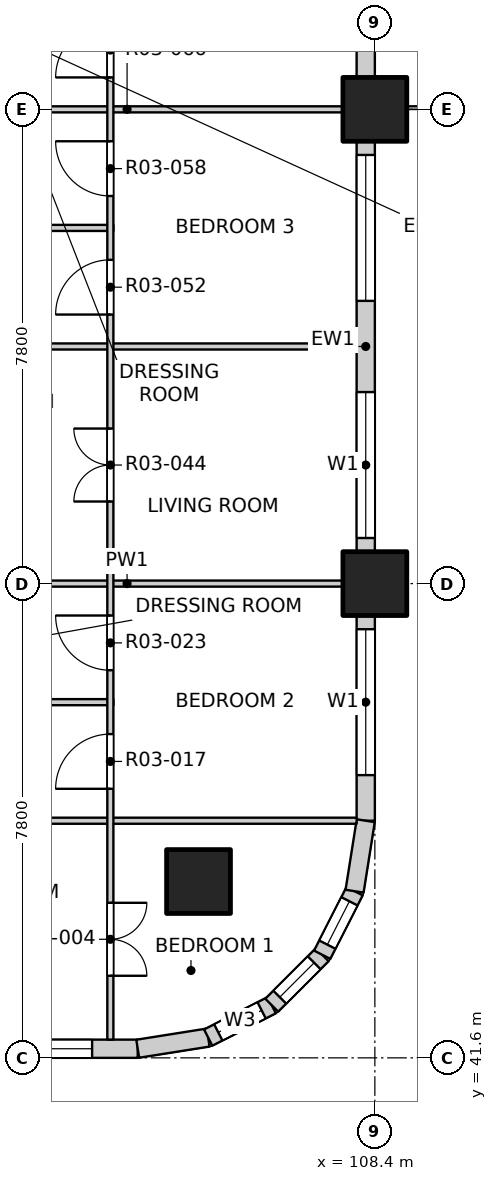
"""IFC4 building model, lengths in metres.
Left out: names, types, materials, properties, quantities, classifications, styles, units other than length and angle.
Written with IfcOpenShell. Run it as: python <this file> out.ifc"""

import sys

from ifc_helpers import new_model, si_unit, direction, frame, frame_2d, origin, origin_2d, place, context, subcontext, project, spatial, rectangle, extrude, element, fill, save


model = new_model("IFC4")
c1 = context("Model", 3, precision=1e-05, world=origin(), true_north=direction((0.0, 1.0)))
c2 = subcontext(c1, "Body", "Model", "MODEL_VIEW")
j1 = project(units=[si_unit("LENGTHUNIT", "METRE"), si_unit("PLANEANGLEUNIT", "RADIAN")], contexts=[c1])
p1 = place(None, origin())
s1 = spatial("IfcSite", under=j1, at=p1, CompositionType="ELEMENT")
p2 = place(p1, origin())
s2 = spatial("IfcBuilding", under=s1, at=p2, CompositionType="ELEMENT")
p3 = place(p2, frame((0.0, 0.0, 43.3)))
s3 = spatial("IfcBuildingStorey", under=s2, at=p3, CompositionType="ELEMENT", Elevation=43.3)
for number, where, z_axis, x_axis in (
    (1, (105.5, 44.5, -0.25), (0.0, 0.0, 1.0), (1.0, 0.0, 0.0)),
    (2, (108.4, 49.4, -0.25), (0.0, 0.0, 1.0), (1.0, 0.0, 0.0)),
    (3, (108.4, 57.2, -0.25), (0.0, 0.0, 1.0), (1.0, 0.0, 0.0)),
):
    element("IfcColumn", number, at=place(p3, frame(where, z_axis=z_axis, x_axis=x_axis)), inside=s3, PredefinedType="COLUMN", context=c2, shape_type="SweptSolid", body=[
        extrude(rectangle(XDim=1.05, YDim=1.05, at=origin_2d()), origin(), (0.0, 0.0, 1.0), 3.35),
    ])
p4 = place(p3, frame((101.125, 41.75, 0.0), z_axis=(0.0, 0.0, 1.0), x_axis=(1.0, 0.0, 0.0)))
e4 = element("IfcWall", 4, at=p4, inside=s3, PredefinedType="SOLIDWALL", context=c2, shape_type="SweptSolid", body=[
    extrude(rectangle(XDim=3.375, YDim=0.3, at=frame_2d((1.688, 0.0))), origin(), (0.0, 0.0, 1.0), 3.1),
])
p5 = place(p4, frame((0.225, 0.0, 0.9)))
e5 = element("IfcOpeningElement", 5, at=p5, cuts=e4, PredefinedType="OPENING", context=c2, shape_type="SweptSolid", body=[
    extrude(rectangle(XDim=2.4, YDim=1.8, at=frame_2d((1.2, 0.9))), frame((0.0, 0.16, 0.0), z_axis=(0.0, -1.0, 0.0), x_axis=(1.0, 0.0, 0.0)), (0.0, 0.0, 1.0), 0.32),
])
p6 = place(p3, frame((108.25, 45.5, 0.0), z_axis=(0.0, 0.0, 1.0), x_axis=(0.0, 1.0, 0.0)))
e6 = element("IfcWall", 6, at=p6, inside=s3, PredefinedType="SOLIDWALL", context=c2, shape_type="SweptSolid", body=[
    extrude(rectangle(XDim=3.375, YDim=0.3, at=frame_2d((1.688, 0.0))), origin(), (0.0, 0.0, 1.0), 3.1),
])
p7 = place(p6, frame((0.75, 0.0, 0.9)))
e7 = element("IfcOpeningElement", 7, at=p7, cuts=e6, PredefinedType="OPENING", context=c2, shape_type="SweptSolid", body=[
    extrude(rectangle(XDim=2.4, YDim=1.8, at=frame_2d((1.2, 0.9))), frame((0.0, 0.16, 0.0), z_axis=(0.0, -1.0, 0.0), x_axis=(1.0, 0.0, 0.0)), (0.0, 0.0, 1.0), 0.32),
])
p8 = place(p3, frame((108.25, 49.925, 0.0), z_axis=(0.0, 0.0, 1.0), x_axis=(0.0, 1.0, 0.0)))
e8 = element("IfcWall", 8, at=p8, inside=s3, PredefinedType="SOLIDWALL", context=c2, shape_type="SweptSolid", body=[
    extrude(rectangle(XDim=6.75, YDim=0.3, at=frame_2d((3.375, 0.0))), origin(), (0.0, 0.0, 1.0), 3.1),
])
p9 = place(p8, frame((0.225, 0.0, 0.9)))
e9 = element("IfcOpeningElement", 9, at=p9, cuts=e8, PredefinedType="OPENING", context=c2, shape_type="SweptSolid", body=[
    extrude(rectangle(XDim=2.4, YDim=1.8, at=frame_2d((1.2, 0.9))), frame((0.0, 0.16, 0.0), z_axis=(0.0, -1.0, 0.0), x_axis=(1.0, 0.0, 0.0)), (0.0, 0.0, 1.0), 0.32),
])
p10 = place(p8, frame((4.125, 0.0, 0.9)))
e10 = element("IfcOpeningElement", 10, at=p10, cuts=e8, PredefinedType="OPENING", context=c2, shape_type="SweptSolid", body=[
    extrude(rectangle(XDim=2.4, YDim=1.8, at=frame_2d((1.2, 0.9))), frame((0.0, 0.16, 0.0), z_axis=(0.0, -1.0, 0.0), x_axis=(1.0, 0.0, 0.0)), (0.0, 0.0, 1.0), 0.32),
])
p11 = place(p3, frame((108.25, 57.725, 0.0), z_axis=(0.0, 0.0, 1.0), x_axis=(0.0, 1.0, 0.0)))
e11 = element("IfcWall", 11, at=p11, inside=s3, PredefinedType="SOLIDWALL", context=c2, shape_type="SweptSolid", body=[
    extrude(rectangle(XDim=6.75, YDim=0.3, at=frame_2d((3.375, 0.0))), origin(), (0.0, 0.0, 1.0), 3.1),
])
p12 = place(p11, frame((0.525, 0.0, 0.0)))
e12 = element("IfcOpeningElement", 12, at=p12, cuts=e11, PredefinedType="OPENING", context=c2, shape_type="SweptSolid", body=[
    extrude(rectangle(XDim=1.8, YDim=2.4, at=frame_2d((0.9, 1.2))), frame((0.0, 0.16, 0.0), z_axis=(0.0, -1.0, 0.0), x_axis=(1.0, 0.0, 0.0)), (0.0, 0.0, 1.0), 0.32),
])
p13 = place(p11, frame((4.125, 0.0, 0.9)))
e13 = element("IfcOpeningElement", 13, at=p13, cuts=e11, PredefinedType="OPENING", context=c2, shape_type="SweptSolid", body=[
    extrude(rectangle(XDim=2.4, YDim=1.8, at=frame_2d((1.2, 0.9))), frame((0.0, 0.16, 0.0), z_axis=(0.0, -1.0, 0.0), x_axis=(1.0, 0.0, 0.0)), (0.0, 0.0, 1.0), 0.32),
])
p14 = place(p3, frame((104.5, 41.75, 0.0), z_axis=(0.0, 0.0, 1.0), x_axis=(0.987678452879, 0.156496880861, 0.0)))
e14 = element("IfcWall", 14, at=p14, inside=s3, PredefinedType="SOLIDWALL", context=c2, shape_type="SweptSolid", body=[
    extrude(rectangle(XDim=1.173, YDim=0.3, at=frame_2d((0.586, 0.0))), origin(), (0.0, 0.0, 1.0), 3.1),
])
p15 = place(p3, frame((105.659, 41.934, 0.0), z_axis=(0.0, 0.0, 1.0), x_axis=(0.890988677504, 0.454025524128, 0.0)))
e15 = element("IfcWall", 15, at=p15, inside=s3, PredefinedType="SOLIDWALL", context=c2, shape_type="SweptSolid", body=[
    extrude(rectangle(XDim=1.173, YDim=0.3, at=frame_2d((0.587, 0.0))), origin(), (0.0, 0.0, 1.0), 3.1),
])
p16 = place(p15, frame((0.187, 0.0, 0.9)))
e16 = element("IfcOpeningElement", 16, at=p16, cuts=e15, PredefinedType="OPENING", context=c2, shape_type="SweptSolid", body=[
    extrude(rectangle(XDim=0.8, YDim=1.2, at=frame_2d((0.4, 0.6))), frame((0.0, 0.16, 0.0), z_axis=(0.0, -1.0, 0.0), x_axis=(1.0, 0.0, 0.0)), (0.0, 0.0, 1.0), 0.32),
])
p17 = place(p3, frame((106.704, 42.466, 0.0), z_axis=(0.0, 0.0, 1.0), x_axis=(0.707106781187, 0.707106781187, 0.0)))
e17 = element("IfcWall", 17, at=p17, inside=s3, PredefinedType="SOLIDWALL", context=c2, shape_type="SweptSolid", body=[
    extrude(rectangle(XDim=1.173, YDim=0.3, at=frame_2d((0.586, 0.0))), origin(), (0.0, 0.0, 1.0), 3.1),
])
p18 = place(p17, frame((0.187, 0.0, 0.9)))
e18 = element("IfcOpeningElement", 18, at=p18, cuts=e17, PredefinedType="OPENING", context=c2, shape_type="SweptSolid", body=[
    extrude(rectangle(XDim=0.8, YDim=1.2, at=frame_2d((0.4, 0.6))), frame((0.0, 0.16, 0.0), z_axis=(0.0, -1.0, 0.0), x_axis=(1.0, 0.0, 0.0)), (0.0, 0.0, 1.0), 0.32),
])
p19 = place(p3, frame((107.534, 43.296, 0.0), z_axis=(0.0, 0.0, 1.0), x_axis=(0.454025524128, 0.890988677504, 0.0)))
e19 = element("IfcWall", 19, at=p19, inside=s3, PredefinedType="SOLIDWALL", context=c2, shape_type="SweptSolid", body=[
    extrude(rectangle(XDim=1.173, YDim=0.3, at=frame_2d((0.587, 0.0))), origin(), (0.0, 0.0, 1.0), 3.1),
])
p20 = place(p19, frame((0.187, 0.0, 0.9)))
e20 = element("IfcOpeningElement", 20, at=p20, cuts=e19, PredefinedType="OPENING", context=c2, shape_type="SweptSolid", body=[
    extrude(rectangle(XDim=0.8, YDim=1.2, at=frame_2d((0.4, 0.6))), frame((0.0, 0.16, 0.0), z_axis=(0.0, -1.0, 0.0), x_axis=(1.0, 0.0, 0.0)), (0.0, 0.0, 1.0), 0.32),
])
p21 = place(p3, frame((108.066, 44.341, 0.0), z_axis=(0.0, 0.0, 1.0), x_axis=(0.156496880861, 0.987678452879, 0.0)))
e21 = element("IfcWall", 21, at=p21, inside=s3, PredefinedType="SOLIDWALL", context=c2, shape_type="SweptSolid", body=[
    extrude(rectangle(XDim=1.173, YDim=0.3, at=frame_2d((0.586, 0.0))), origin(), (0.0, 0.0, 1.0), 3.1),
])
p22 = place(p3, frame((96.6, 45.5, 0.0), z_axis=(0.0, 0.0, 1.0), x_axis=(1.0, 0.0, 0.0)))
e22 = element("IfcWall", 22, at=p22, inside=s3, PredefinedType="PARTITIONING", context=c2, shape_type="SweptSolid", body=[
    extrude(rectangle(XDim=11.5, YDim=0.1, at=frame_2d((5.75, 0.0))), origin(), (0.0, 0.0, 1.0), 3.1),
])
p23 = place(p22, frame((2.635, 0.0, 0.0)))
e23 = element("IfcOpeningElement", 23, at=p23, cuts=e22, PredefinedType="OPENING", context=c2, shape_type="SweptSolid", body=[
    extrude(rectangle(XDim=0.9, YDim=2.1, at=frame_2d((0.45, 1.05))), frame((0.0, 0.06, 0.0), z_axis=(0.0, -1.0, 0.0), x_axis=(1.0, 0.0, 0.0)), (0.0, 0.0, 1.0), 0.12),
])
p24 = place(p3, frame((100.55, 47.45, 0.0), z_axis=(0.0, 0.0, 1.0), x_axis=(1.0, 0.0, 0.0)))
e24 = element("IfcWall", 24, at=p24, inside=s3, PredefinedType="PARTITIONING", context=c2, shape_type="SweptSolid", body=[
    extrude(rectangle(XDim=3.55, YDim=0.1, at=frame_2d((1.775, 0.0))), origin(), (0.0, 0.0, 1.0), 3.1),
])
for number, where, z_axis, x_axis in (
    (25, (100.55, 49.4, 0.0), (0.0, 0.0, 1.0), (1.0, 0.0, 0.0)),
    (26, (100.55, 53.3, 0.0), (0.0, 0.0, 1.0), (1.0, 0.0, 0.0)),
):
    element("IfcWall", number, at=place(p3, frame(where, z_axis=z_axis, x_axis=x_axis)), inside=s3, PredefinedType="PARTITIONING", context=c2, shape_type="SweptSolid", body=[
        extrude(rectangle(XDim=7.55, YDim=0.1, at=frame_2d((3.775, 0.0))), origin(), (0.0, 0.0, 1.0), 3.1),
    ])
p25 = place(p3, frame((100.55, 55.25, 0.0), z_axis=(0.0, 0.0, 1.0), x_axis=(1.0, 0.0, 0.0)))
e27 = element("IfcWall", 27, at=p25, inside=s3, PredefinedType="PARTITIONING", context=c2, shape_type="SweptSolid", body=[
    extrude(rectangle(XDim=3.55, YDim=0.1, at=frame_2d((1.775, 0.0))), origin(), (0.0, 0.0, 1.0), 3.1),
])
p26 = place(p3, frame((100.55, 57.2, 0.0), z_axis=(0.0, 0.0, 1.0), x_axis=(1.0, 0.0, 0.0)))
e28 = element("IfcWall", 28, at=p26, inside=s3, PredefinedType="PARTITIONING", context=c2, shape_type="SweptSolid", body=[
    extrude(rectangle(XDim=7.55, YDim=0.1, at=frame_2d((3.775, 0.0))), origin(), (0.0, 0.0, 1.0), 3.1),
])
p27 = place(p3, frame((104.05, 41.9, 0.0), z_axis=(0.0, 0.0, 1.0), x_axis=(0.0, 1.0, 0.0)))
e29 = element("IfcWall", 29, at=p27, inside=s3, PredefinedType="PARTITIONING", context=c2, shape_type="SweptSolid", body=[
    extrude(rectangle(XDim=46.2, YDim=0.1, at=frame_2d((23.1, 0.0))), origin(), (0.0, 0.0, 1.0), 3.1),
])
p28 = place(p27, frame((1.05, 0.0, 0.0)))
e30 = element("IfcOpeningElement", 30, at=p28, cuts=e29, PredefinedType="OPENING", context=c2, shape_type="SweptSolid", body=[
    extrude(rectangle(XDim=1.2, YDim=2.1, at=frame_2d((0.6, 1.05))), frame((0.0, 0.06, 0.0), z_axis=(0.0, -1.0, 0.0), x_axis=(1.0, 0.0, 0.0)), (0.0, 0.0, 1.0), 0.12),
])
p29 = place(p27, frame((4.125, 0.0, 0.0)))
e31 = element("IfcOpeningElement", 31, at=p29, cuts=e29, PredefinedType="OPENING", context=c2, shape_type="SweptSolid", body=[
    extrude(rectangle(XDim=0.9, YDim=2.1, at=frame_2d((0.45, 1.05))), frame((0.0, 0.06, 0.0), z_axis=(0.0, -1.0, 0.0), x_axis=(1.0, 0.0, 0.0)), (0.0, 0.0, 1.0), 0.12),
])
p30 = place(p27, frame((6.075, 0.0, 0.0)))
e32 = element("IfcOpeningElement", 32, at=p30, cuts=e29, PredefinedType="OPENING", context=c2, shape_type="SweptSolid", body=[
    extrude(rectangle(XDim=0.9, YDim=2.1, at=frame_2d((0.45, 1.05))), frame((0.0, 0.06, 0.0), z_axis=(0.0, -1.0, 0.0), x_axis=(1.0, 0.0, 0.0)), (0.0, 0.0, 1.0), 0.12),
])
p31 = place(p27, frame((8.85, 0.0, 0.0)))
e33 = element("IfcOpeningElement", 33, at=p31, cuts=e29, PredefinedType="OPENING", context=c2, shape_type="SweptSolid", body=[
    extrude(rectangle(XDim=1.2, YDim=2.1, at=frame_2d((0.6, 1.05))), frame((0.0, 0.06, 0.0), z_axis=(0.0, -1.0, 0.0), x_axis=(1.0, 0.0, 0.0)), (0.0, 0.0, 1.0), 0.12),
])
p32 = place(p27, frame((11.925, 0.0, 0.0)))
e34 = element("IfcOpeningElement", 34, at=p32, cuts=e29, PredefinedType="OPENING", context=c2, shape_type="SweptSolid", body=[
    extrude(rectangle(XDim=0.9, YDim=2.1, at=frame_2d((0.45, 1.05))), frame((0.0, 0.06, 0.0), z_axis=(0.0, -1.0, 0.0), x_axis=(1.0, 0.0, 0.0)), (0.0, 0.0, 1.0), 0.12),
])
p33 = place(p27, frame((13.875, 0.0, 0.0)))
e35 = element("IfcOpeningElement", 35, at=p33, cuts=e29, PredefinedType="OPENING", context=c2, shape_type="SweptSolid", body=[
    extrude(rectangle(XDim=0.9, YDim=2.1, at=frame_2d((0.45, 1.05))), frame((0.0, 0.06, 0.0), z_axis=(0.0, -1.0, 0.0), x_axis=(1.0, 0.0, 0.0)), (0.0, 0.0, 1.0), 0.12),
])
p34 = place(p27, frame((15.825, 0.0, 0.0)))
e36 = element("IfcOpeningElement", 36, at=p34, cuts=e29, PredefinedType="OPENING", context=c2, shape_type="SweptSolid", body=[
    extrude(rectangle(XDim=0.9, YDim=2.1, at=frame_2d((0.45, 1.05))), frame((0.0, 0.06, 0.0), z_axis=(0.0, -1.0, 0.0), x_axis=(1.0, 0.0, 0.0)), (0.0, 0.0, 1.0), 0.12),
])
p35 = place(p27, frame((17.775, 0.0, 0.0)))
e37 = element("IfcOpeningElement", 37, at=p35, cuts=e29, PredefinedType="OPENING", context=c2, shape_type="SweptSolid", body=[
    extrude(rectangle(XDim=0.9, YDim=2.1, at=frame_2d((0.45, 1.05))), frame((0.0, 0.06, 0.0), z_axis=(0.0, -1.0, 0.0), x_axis=(1.0, 0.0, 0.0)), (0.0, 0.0, 1.0), 0.12),
])
p36 = place(p27, frame((19.725, 0.0, 0.0)))
e38 = element("IfcOpeningElement", 38, at=p36, cuts=e29, PredefinedType="OPENING", context=c2, shape_type="SweptSolid", body=[
    extrude(rectangle(XDim=0.9, YDim=2.1, at=frame_2d((0.45, 1.05))), frame((0.0, 0.06, 0.0), z_axis=(0.0, -1.0, 0.0), x_axis=(1.0, 0.0, 0.0)), (0.0, 0.0, 1.0), 0.12),
])
p37 = place(p27, frame((21.675, 0.0, 0.0)))
e39 = element("IfcOpeningElement", 39, at=p37, cuts=e29, PredefinedType="OPENING", context=c2, shape_type="SweptSolid", body=[
    extrude(rectangle(XDim=0.9, YDim=2.1, at=frame_2d((0.45, 1.05))), frame((0.0, 0.06, 0.0), z_axis=(0.0, -1.0, 0.0), x_axis=(1.0, 0.0, 0.0)), (0.0, 0.0, 1.0), 0.12),
])
p38 = place(p27, frame((24.45, 0.0, 0.0)))
e40 = element("IfcOpeningElement", 40, at=p38, cuts=e29, PredefinedType="OPENING", context=c2, shape_type="SweptSolid", body=[
    extrude(rectangle(XDim=1.2, YDim=2.1, at=frame_2d((0.6, 1.05))), frame((0.0, 0.06, 0.0), z_axis=(0.0, -1.0, 0.0), x_axis=(1.0, 0.0, 0.0)), (0.0, 0.0, 1.0), 0.12),
])
p39 = place(p27, frame((28.35, 0.0, 0.0)))
e41 = element("IfcOpeningElement", 41, at=p39, cuts=e29, PredefinedType="OPENING", context=c2, shape_type="SweptSolid", body=[
    extrude(rectangle(XDim=1.2, YDim=2.1, at=frame_2d((0.6, 1.05))), frame((0.0, 0.06, 0.0), z_axis=(0.0, -1.0, 0.0), x_axis=(1.0, 0.0, 0.0)), (0.0, 0.0, 1.0), 0.12),
])
p40 = place(p27, frame((31.425, 0.0, 0.0)))
e42 = element("IfcOpeningElement", 42, at=p40, cuts=e29, PredefinedType="OPENING", context=c2, shape_type="SweptSolid", body=[
    extrude(rectangle(XDim=0.9, YDim=2.1, at=frame_2d((0.45, 1.05))), frame((0.0, 0.06, 0.0), z_axis=(0.0, -1.0, 0.0), x_axis=(1.0, 0.0, 0.0)), (0.0, 0.0, 1.0), 0.12),
])
p41 = place(p27, frame((33.375, 0.0, 0.0)))
e43 = element("IfcOpeningElement", 43, at=p41, cuts=e29, PredefinedType="OPENING", context=c2, shape_type="SweptSolid", body=[
    extrude(rectangle(XDim=0.9, YDim=2.1, at=frame_2d((0.45, 1.05))), frame((0.0, 0.06, 0.0), z_axis=(0.0, -1.0, 0.0), x_axis=(1.0, 0.0, 0.0)), (0.0, 0.0, 1.0), 0.12),
])
p42 = place(p27, frame((35.325, 0.0, 0.0)))
e44 = element("IfcOpeningElement", 44, at=p42, cuts=e29, PredefinedType="OPENING", context=c2, shape_type="SweptSolid", body=[
    extrude(rectangle(XDim=0.9, YDim=2.1, at=frame_2d((0.45, 1.05))), frame((0.0, 0.06, 0.0), z_axis=(0.0, -1.0, 0.0), x_axis=(1.0, 0.0, 0.0)), (0.0, 0.0, 1.0), 0.12),
])
p43 = place(p27, frame((37.275, 0.0, 0.0)))
e45 = element("IfcOpeningElement", 45, at=p43, cuts=e29, PredefinedType="OPENING", context=c2, shape_type="SweptSolid", body=[
    extrude(rectangle(XDim=0.9, YDim=2.1, at=frame_2d((0.45, 1.05))), frame((0.0, 0.06, 0.0), z_axis=(0.0, -1.0, 0.0), x_axis=(1.0, 0.0, 0.0)), (0.0, 0.0, 1.0), 0.12),
])
p44 = place(p27, frame((40.05, 0.0, 0.0)))
e46 = element("IfcOpeningElement", 46, at=p44, cuts=e29, PredefinedType="OPENING", context=c2, shape_type="SweptSolid", body=[
    extrude(rectangle(XDim=1.2, YDim=2.1, at=frame_2d((0.6, 1.05))), frame((0.0, 0.06, 0.0), z_axis=(0.0, -1.0, 0.0), x_axis=(1.0, 0.0, 0.0)), (0.0, 0.0, 1.0), 0.12),
])
p45 = place(p27, frame((43.95, 0.0, 0.0)))
e47 = element("IfcOpeningElement", 47, at=p45, cuts=e29, PredefinedType="OPENING", context=c2, shape_type="SweptSolid", body=[
    extrude(rectangle(XDim=1.2, YDim=2.1, at=frame_2d((0.6, 1.05))), frame((0.0, 0.06, 0.0), z_axis=(0.0, -1.0, 0.0), x_axis=(1.0, 0.0, 0.0)), (0.0, 0.0, 1.0), 0.12),
])
p46 = place(p5, origin())
e48 = element("IfcWindow", 48, at=p46, inside=s3, PartitioningType="DOUBLE_PANEL_VERTICAL", PredefinedType="WINDOW", context=c2, shape_type="SweptSolid", body=[
    extrude(rectangle(XDim=2.4, YDim=1.8, at=frame_2d((1.2, 0.9))), frame((0.0, 0.03, 0.0), z_axis=(0.0, -1.0, 0.0), x_axis=(1.0, 0.0, 0.0)), (0.0, 0.0, 1.0), 0.06),
])
fill(e5, e48)
p47 = place(p7, origin())
e49 = element("IfcWindow", 49, at=p47, inside=s3, PartitioningType="DOUBLE_PANEL_VERTICAL", PredefinedType="WINDOW", context=c2, shape_type="SweptSolid", body=[
    extrude(rectangle(XDim=2.4, YDim=1.8, at=frame_2d((1.2, 0.9))), frame((0.0, 0.03, 0.0), z_axis=(0.0, -1.0, 0.0), x_axis=(1.0, 0.0, 0.0)), (0.0, 0.0, 1.0), 0.06),
])
fill(e7, e49)
p48 = place(p9, origin())
e50 = element("IfcWindow", 50, at=p48, inside=s3, PartitioningType="DOUBLE_PANEL_VERTICAL", PredefinedType="WINDOW", context=c2, shape_type="SweptSolid", body=[
    extrude(rectangle(XDim=2.4, YDim=1.8, at=frame_2d((1.2, 0.9))), frame((0.0, 0.03, 0.0), z_axis=(0.0, -1.0, 0.0), x_axis=(1.0, 0.0, 0.0)), (0.0, 0.0, 1.0), 0.06),
])
fill(e9, e50)
p49 = place(p10, origin())
e51 = element("IfcWindow", 51, at=p49, inside=s3, PartitioningType="DOUBLE_PANEL_VERTICAL", PredefinedType="WINDOW", context=c2, shape_type="SweptSolid", body=[
    extrude(rectangle(XDim=2.4, YDim=1.8, at=frame_2d((1.2, 0.9))), frame((0.0, 0.03, 0.0), z_axis=(0.0, -1.0, 0.0), x_axis=(1.0, 0.0, 0.0)), (0.0, 0.0, 1.0), 0.06),
])
fill(e10, e51)
p50 = place(p16, origin())
e52 = element("IfcWindow", 52, at=p50, inside=s3, PartitioningType="SINGLE_PANEL", PredefinedType="WINDOW", context=c2, shape_type="SweptSolid", body=[
    extrude(rectangle(XDim=0.8, YDim=1.2, at=frame_2d((0.4, 0.6))), frame((0.0, 0.03, 0.0), z_axis=(0.0, -1.0, 0.0), x_axis=(1.0, 0.0, 0.0)), (0.0, 0.0, 1.0), 0.06),
])
fill(e16, e52)
p51 = place(p18, origin())
e53 = element("IfcWindow", 53, at=p51, inside=s3, PartitioningType="SINGLE_PANEL", PredefinedType="WINDOW", context=c2, shape_type="SweptSolid", body=[
    extrude(rectangle(XDim=0.8, YDim=1.2, at=frame_2d((0.4, 0.6))), frame((0.0, 0.03, 0.0), z_axis=(0.0, -1.0, 0.0), x_axis=(1.0, 0.0, 0.0)), (0.0, 0.0, 1.0), 0.06),
])
fill(e18, e53)
p52 = place(p20, origin())
e54 = element("IfcWindow", 54, at=p52, inside=s3, PartitioningType="SINGLE_PANEL", PredefinedType="WINDOW", context=c2, shape_type="SweptSolid", body=[
    extrude(rectangle(XDim=0.8, YDim=1.2, at=frame_2d((0.4, 0.6))), frame((0.0, 0.03, 0.0), z_axis=(0.0, -1.0, 0.0), x_axis=(1.0, 0.0, 0.0)), (0.0, 0.0, 1.0), 0.06),
])
fill(e20, e54)
p53 = place(p28, origin())
e55 = element("IfcDoor", 55, at=p53, inside=s3, OperationType="DOUBLE_DOOR_SINGLE_SWING", PredefinedType="DOOR", context=c2, shape_type="SweptSolid", body=[
    extrude(rectangle(XDim=1.2, YDim=2.1, at=frame_2d((0.6, 1.05))), frame((0.0, 0.025, 0.0), z_axis=(0.0, -1.0, 0.0), x_axis=(1.0, 0.0, 0.0)), (0.0, 0.0, 1.0), 0.05),
])
fill(e30, e55)
p54 = place(p29, origin())
e56 = element("IfcDoor", 56, at=p54, inside=s3, OperationType="SINGLE_SWING_LEFT", PredefinedType="DOOR", context=c2, shape_type="SweptSolid", body=[
    extrude(rectangle(XDim=0.9, YDim=2.1, at=frame_2d((0.45, 1.05))), frame((0.0, 0.025, 0.0), z_axis=(0.0, -1.0, 0.0), x_axis=(1.0, 0.0, 0.0)), (0.0, 0.0, 1.0), 0.05),
])
fill(e31, e56)
p55 = place(p30, origin())
e57 = element("IfcDoor", 57, at=p55, inside=s3, OperationType="SINGLE_SWING_RIGHT", PredefinedType="DOOR", context=c2, shape_type="SweptSolid", body=[
    extrude(rectangle(XDim=0.9, YDim=2.1, at=frame_2d((0.45, 1.05))), frame((0.0, 0.025, 0.0), z_axis=(0.0, -1.0, 0.0), x_axis=(1.0, 0.0, 0.0)), (0.0, 0.0, 1.0), 0.05),
])
fill(e32, e57)
p56 = place(p31, origin())
e58 = element("IfcDoor", 58, at=p56, inside=s3, OperationType="DOUBLE_DOOR_SINGLE_SWING", PredefinedType="DOOR", context=c2, shape_type="SweptSolid", body=[
    extrude(rectangle(XDim=1.2, YDim=2.1, at=frame_2d((0.6, 1.05))), frame((0.0, 0.025, 0.0), z_axis=(0.0, -1.0, 0.0), x_axis=(1.0, 0.0, 0.0)), (0.0, 0.0, 1.0), 0.05),
])
fill(e33, e58)
p57 = place(p32, origin())
e59 = element("IfcDoor", 59, at=p57, inside=s3, OperationType="SINGLE_SWING_LEFT", PredefinedType="DOOR", context=c2, shape_type="SweptSolid", body=[
    extrude(rectangle(XDim=0.9, YDim=2.1, at=frame_2d((0.45, 1.05))), frame((0.0, 0.025, 0.0), z_axis=(0.0, -1.0, 0.0), x_axis=(1.0, 0.0, 0.0)), (0.0, 0.0, 1.0), 0.05),
])
fill(e34, e59)
p58 = place(p33, origin())
e60 = element("IfcDoor", 60, at=p58, inside=s3, OperationType="SINGLE_SWING_RIGHT", PredefinedType="DOOR", context=c2, shape_type="SweptSolid", body=[
    extrude(rectangle(XDim=0.9, YDim=2.1, at=frame_2d((0.45, 1.05))), frame((0.0, 0.025, 0.0), z_axis=(0.0, -1.0, 0.0), x_axis=(1.0, 0.0, 0.0)), (0.0, 0.0, 1.0), 0.05),
])
fill(e35, e60)
p59 = place(p34, origin())
e61 = element("IfcDoor", 61, at=p59, inside=s3, OperationType="SINGLE_SWING_LEFT", PredefinedType="DOOR", context=c2, shape_type="SweptSolid", body=[
    extrude(rectangle(XDim=0.9, YDim=2.1, at=frame_2d((0.45, 1.05))), frame((0.0, 0.025, 0.0), z_axis=(0.0, -1.0, 0.0), x_axis=(1.0, 0.0, 0.0)), (0.0, 0.0, 1.0), 0.05),
])
fill(e36, e61)
save(model, sys.argv[1])
